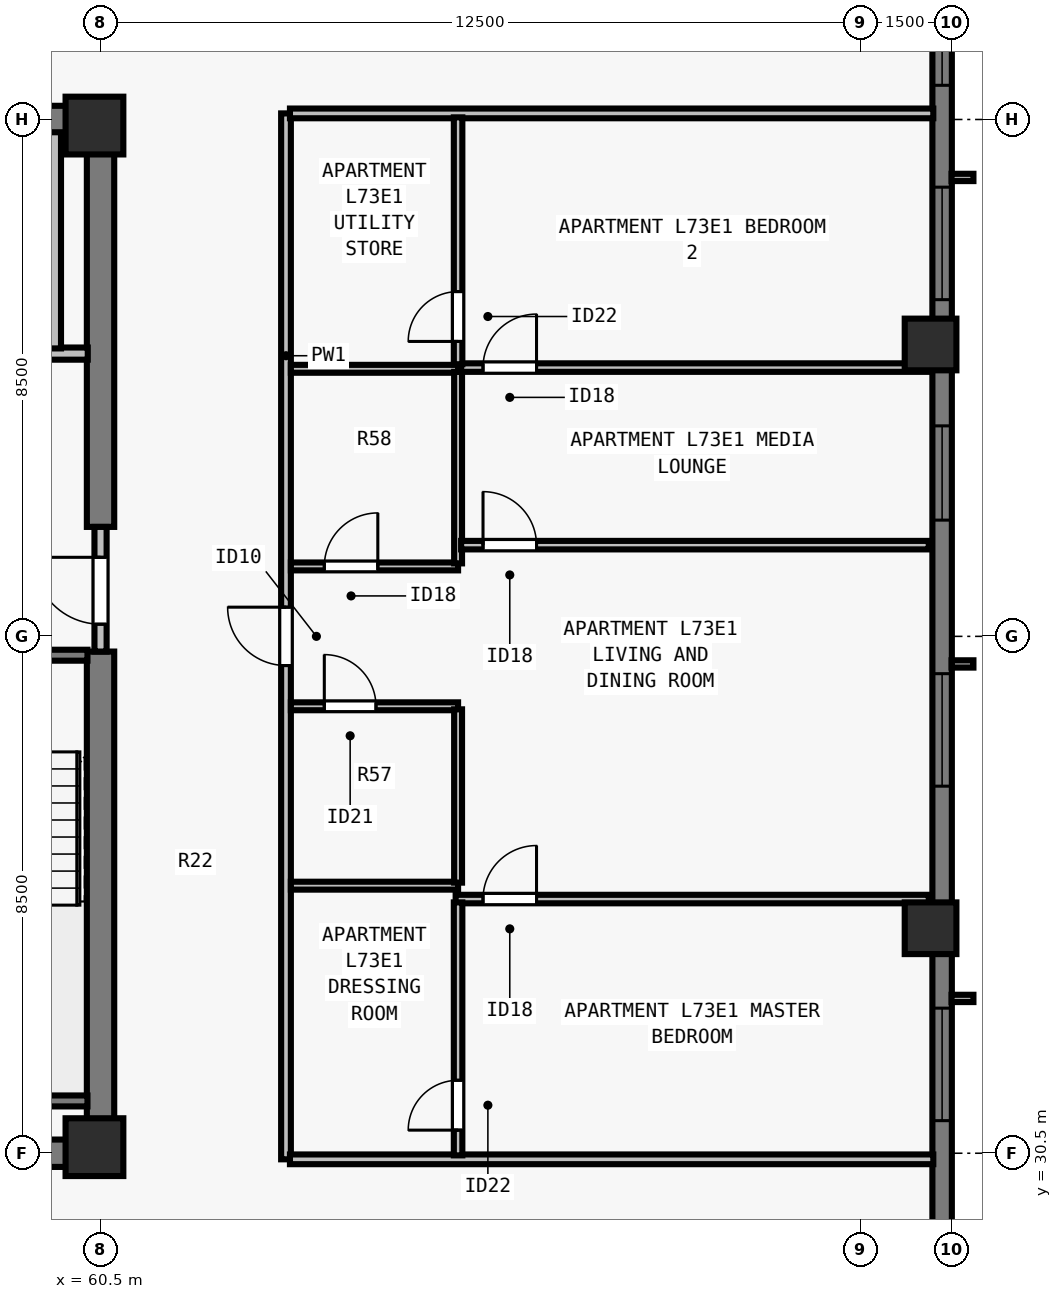
"""IFC4 building model, lengths in metres.
Left out: names, types, materials, properties, quantities, classifications, styles, units other than length and angle.
Written with IfcOpenShell. Run it as: python <this file> out.ifc"""

import sys

from ifc_helpers import new_model, si_unit, direction, frame, frame_2d, origin, origin_2d, place, context, subcontext, project, spatial, rectangle, extrude, element, fill, save


model = new_model("IFC4")
c1 = context("Model", 3, precision=1e-05, world=origin(), true_north=direction((0.0, 1.0)))
c2 = subcontext(c1, "Body", "Model", "MODEL_VIEW")
j1 = project(units=[si_unit("LENGTHUNIT", "METRE"), si_unit("PLANEANGLEUNIT", "RADIAN")], contexts=[c1])
p1 = place(None, origin())
s1 = spatial("IfcSite", under=j1, at=p1, CompositionType="ELEMENT")
p2 = place(p1, origin())
s2 = spatial("IfcBuilding", under=s1, at=p2, CompositionType="ELEMENT")
p3 = place(p2, frame((0.0, 0.0, 265.5)))
s3 = spatial("IfcBuildingStorey", under=s2, at=p3, CompositionType="ELEMENT", Elevation=265.5)
for number, where, z_axis, x_axis in (
    (1, (60.4, 30.6, 0.0), (0.0, 0.0, 1.0), (1.0, 0.0, 0.0)),
    (2, (60.4, 47.4, 0.0), (0.0, 0.0, 1.0), (1.0, 0.0, 0.0)),
):
    element("IfcColumn", number, at=place(p3, frame(where, z_axis=z_axis, x_axis=x_axis)), inside=s3, PredefinedType="COLUMN", context=c2, shape_type="SweptSolid", body=[
        extrude(rectangle(XDim=0.95, YDim=0.95, at=origin_2d()), origin(), (0.0, 0.0, 1.0), 3.5),
    ])
for number, where, z_axis, x_axis in (
    (3, (74.15, 34.2, 0.0), (0.0, 0.0, 1.0), (0.0, 1.0, 0.0)),
    (4, (74.15, 43.8, 0.0), (0.0, 0.0, 1.0), (0.0, 1.0, 0.0)),
):
    element("IfcColumn", number, at=place(p3, frame(where, z_axis=z_axis, x_axis=x_axis)), inside=s3, PredefinedType="COLUMN", context=c2, shape_type="SweptSolid", body=[
        extrude(rectangle(XDim=0.85, YDim=0.85, at=origin_2d()), origin(), (0.0, 0.0, 1.0), 3.5),
    ])
p4 = place(p3, frame((74.34, 56.5, 0.0), z_axis=(0.0, 0.0, 1.0), x_axis=(0.0, -1.0, 0.0)))
e5 = element("IfcWall", 5, at=p4, inside=s3, PredefinedType="SOLIDWALL", context=c2, shape_type="SweptSolid", body=[
    extrude(rectangle(XDim=34.702, YDim=0.32, at=frame_2d((17.351, 0.0))), origin(), (0.0, 0.0, 1.0), 3.29),
])
p5 = place(p4, frame((6.888, 0.0, 0.8)))
e6 = element("IfcOpeningElement", 6, at=p5, cuts=e5, PredefinedType="OPENING", context=c2, shape_type="SweptSolid", body=[
    extrude(rectangle(XDim=1.55, YDim=1.678, at=frame_2d((0.775, 0.839))), frame((0.0, 0.17, 0.0), z_axis=(0.0, -1.0, 0.0), x_axis=(1.0, 0.0, 0.0)), (0.0, 0.0, 1.0), 0.34),
])
p6 = place(p4, frame((10.113, 0.0, 0.8)))
e7 = element("IfcOpeningElement", 7, at=p6, cuts=e5, PredefinedType="OPENING", context=c2, shape_type="SweptSolid", body=[
    extrude(rectangle(XDim=1.85, YDim=1.678, at=frame_2d((0.925, 0.839))), frame((0.0, 0.17, 0.0), z_axis=(0.0, -1.0, 0.0), x_axis=(1.0, 0.0, 0.0)), (0.0, 0.0, 1.0), 0.34),
])
p7 = place(p4, frame((14.038, 0.0, 0.8)))
e8 = element("IfcOpeningElement", 8, at=p7, cuts=e5, PredefinedType="OPENING", context=c2, shape_type="SweptSolid", body=[
    extrude(rectangle(XDim=1.55, YDim=1.678, at=frame_2d((0.775, 0.839))), frame((0.0, 0.17, 0.0), z_axis=(0.0, -1.0, 0.0), x_axis=(1.0, 0.0, 0.0)), (0.0, 0.0, 1.0), 0.34),
])
p8 = place(p4, frame((18.114, 0.0, 0.8)))
e9 = element("IfcOpeningElement", 9, at=p8, cuts=e5, PredefinedType="OPENING", context=c2, shape_type="SweptSolid", body=[
    extrude(rectangle(XDim=1.85, YDim=1.678, at=frame_2d((0.925, 0.839))), frame((0.0, 0.17, 0.0), z_axis=(0.0, -1.0, 0.0), x_axis=(1.0, 0.0, 0.0)), (0.0, 0.0, 1.0), 0.34),
])
p9 = place(p4, frame((23.614, 0.0, 0.8)))
e10 = element("IfcOpeningElement", 10, at=p9, cuts=e5, PredefinedType="OPENING", context=c2, shape_type="SweptSolid", body=[
    extrude(rectangle(XDim=1.85, YDim=1.678, at=frame_2d((0.925, 0.839))), frame((0.0, 0.17, 0.0), z_axis=(0.0, -1.0, 0.0), x_axis=(1.0, 0.0, 0.0)), (0.0, 0.0, 1.0), 0.34),
])
p10 = place(p4, frame((29.24, 0.0, 0.8)))
e11 = element("IfcOpeningElement", 11, at=p10, cuts=e5, PredefinedType="OPENING", context=c2, shape_type="SweptSolid", body=[
    extrude(rectangle(XDim=1.55, YDim=1.678, at=frame_2d((0.775, 0.839))), frame((0.0, 0.17, 0.0), z_axis=(0.0, -1.0, 0.0), x_axis=(1.0, 0.0, 0.0)), (0.0, 0.0, 1.0), 0.34),
])
for number, where, z_axis, x_axis in (
    (12, (43.275, 30.5, 0.0), (0.0, 0.0, 1.0), (1.0, 0.0, 0.0)),
    (13, (43.275, 47.5, 0.0), (0.0, 0.0, 1.0), (1.0, 0.0, 0.0)),
):
    element("IfcWall", number, at=place(p3, frame(where, z_axis=z_axis, x_axis=x_axis)), inside=s3, PredefinedType="SHEAR", context=c2, shape_type="SweptSolid", body=[
        extrude(rectangle(XDim=17.45, YDim=0.45, at=frame_2d((8.725, 0.0))), origin(), (0.0, 0.0, 1.0), 3.29),
    ])
p11 = place(p3, frame((60.5, 30.715, 0.0), z_axis=(0.0, 0.0, 1.0), x_axis=(0.0, 1.0, 0.0)))
e14 = element("IfcWall", 14, at=p11, inside=s3, PredefinedType="SHEAR", context=c2, shape_type="SweptSolid", body=[
    extrude(rectangle(XDim=8.035, YDim=0.45, at=frame_2d((4.018, 0.0))), origin(), (0.0, 0.0, 1.0), 3.29),
])
p12 = place(p3, frame((60.5, 40.8, 0.0), z_axis=(0.0, 0.0, 1.0), x_axis=(0.0, 1.0, 0.0)))
e15 = element("IfcWall", 15, at=p12, inside=s3, PredefinedType="SHEAR", context=c2, shape_type="SweptSolid", body=[
    extrude(rectangle(XDim=6.485, YDim=0.45, at=frame_2d((3.242, 0.0))), origin(), (0.0, 0.0, 1.0), 3.29),
])
p13 = place(p3, frame((60.5, 38.75, 0.0), z_axis=(0.0, 0.0, 1.0), x_axis=(0.0, 1.0, 0.0)))
e16 = element("IfcWall", 16, at=p13, inside=s3, PredefinedType="SOLIDWALL", context=c2, shape_type="SweptSolid", body=[
    extrude(rectangle(XDim=2.05, YDim=0.2, at=frame_2d((1.025, 0.0))), origin(), (0.0, 0.0, 1.0), 3.29),
])
p14 = place(p13, frame((0.45, 0.0, 0.0)))
e17 = element("IfcOpeningElement", 17, at=p14, cuts=e16, PredefinedType="OPENING", context=c2, shape_type="SweptSolid", body=[
    extrude(rectangle(XDim=1.1, YDim=2.15, at=frame_2d((0.55, 1.075))), frame((0.0, 0.11, 0.0), z_axis=(0.0, -1.0, 0.0), x_axis=(1.0, 0.0, 0.0)), (0.0, 0.0, 1.0), 0.22),
])
p15 = place(p3, frame((56.735, 43.65, 0.0), z_axis=(0.0, 0.0, 1.0), x_axis=(1.0, 0.0, 0.0)))
e18 = element("IfcWall", 18, at=p15, inside=s3, PredefinedType="SOLIDWALL", context=c2, shape_type="SweptSolid", body=[
    extrude(rectangle(XDim=3.555, YDim=0.2, at=frame_2d((1.777, 0.0))), origin(), (0.0, 0.0, 1.0), 3.29),
])
p16 = place(p15, frame((1.295, 0.0, 0.0)))
e19 = element("IfcOpeningElement", 19, at=p16, cuts=e18, PredefinedType="OPENING", context=c2, shape_type="SweptSolid", body=[
    extrude(rectangle(XDim=1.1, YDim=2.2, at=frame_2d((0.55, 1.1))), frame((0.0, 0.11, 0.0), z_axis=(0.0, -1.0, 0.0), x_axis=(1.0, 0.0, 0.0)), (0.0, 0.0, 1.0), 0.22),
])
p17 = place(p3, frame((59.75, 43.735, 0.0), z_axis=(0.0, 0.0, 1.0), x_axis=(0.0, 1.0, 0.0)))
e20 = element("IfcWall", 20, at=p17, inside=s3, PredefinedType="SOLIDWALL", context=c2, shape_type="SweptSolid", body=[
    extrude(rectangle(XDim=3.555, YDim=0.2, at=frame_2d((1.777, 0.0))), origin(), (0.0, 0.0, 1.0), 3.29),
])
p18 = place(p3, frame((63.55, 30.4, 0.0), z_axis=(0.0, 0.0, 1.0), x_axis=(0.0, 1.0, 0.0)))
e21 = element("IfcWall", 21, at=p18, inside=s3, PredefinedType="PARTITIONING", context=c2, shape_type="SweptSolid", body=[
    extrude(rectangle(XDim=17.2, YDim=0.16, at=frame_2d((8.6, 0.0))), origin(), (0.0, 0.0, 1.0), 3.29),
])
p19 = place(p18, frame((8.12, 0.0, 0.0)))
e22 = element("IfcOpeningElement", 22, at=p19, cuts=e21, PredefinedType="OPENING", context=c2, shape_type="SweptSolid", body=[
    extrude(rectangle(XDim=0.96, YDim=2.18, at=frame_2d((0.48, 1.09))), frame((0.0, 0.09, 0.0), z_axis=(0.0, -1.0, 0.0), x_axis=(1.0, 0.0, 0.0)), (0.0, 0.0, 1.0), 0.18),
])
for number, where, z_axis, x_axis in (
    (23, (63.615, 30.4, 0.0), (0.0, 0.0, 1.0), (1.0, 0.0, 0.0)),
    (24, (63.615, 47.6, 0.0), (0.0, 0.0, 1.0), (1.0, 0.0, 0.0)),
):
    element("IfcWall", number, at=place(p3, frame(where, z_axis=z_axis, x_axis=x_axis)), inside=s3, PredefinedType="PARTITIONING", context=c2, shape_type="SweptSolid", body=[
        extrude(rectangle(XDim=10.58, YDim=0.16, at=frame_2d((5.29, 0.0))), origin(), (0.0, 0.0, 1.0), 3.29),
    ])
p20 = place(p3, frame((63.63, 34.9, 0.0), z_axis=(0.0, 0.0, 1.0), x_axis=(1.0, 0.0, 0.0)))
e25 = element("IfcWall", 25, at=p20, inside=s3, PredefinedType="PLUMBINGWALL", context=c2, shape_type="SweptSolid", body=[
    extrude(rectangle(XDim=2.75, YDim=0.13, at=frame_2d((1.375, 0.0))), origin(), (0.0, 0.0, 1.0), 3.29),
])
p21 = place(p3, frame((63.63, 37.85, 0.0), z_axis=(0.0, 0.0, 1.0), x_axis=(1.0, 0.0, 0.0)))
e26 = element("IfcWall", 26, at=p21, inside=s3, PredefinedType="PLUMBINGWALL", context=c2, shape_type="SweptSolid", body=[
    extrude(rectangle(XDim=2.75, YDim=0.13, at=frame_2d((1.375, 0.0))), origin(), (0.0, 0.0, 1.0), 3.29),
])
p22 = place(p21, frame((0.55, 0.0, 0.0)))
e27 = element("IfcOpeningElement", 27, at=p22, cuts=e26, PredefinedType="OPENING", context=c2, shape_type="SweptSolid", body=[
    extrude(rectangle(XDim=0.85, YDim=2.08, at=frame_2d((0.425, 1.04))), frame((0.0, 0.075, 0.0), z_axis=(0.0, -1.0, 0.0), x_axis=(1.0, 0.0, 0.0)), (0.0, 0.0, 1.0), 0.15),
])
p23 = place(p3, frame((66.38, 34.95, 0.0), z_axis=(0.0, 0.0, 1.0), x_axis=(0.0, 1.0, 0.0)))
e28 = element("IfcWall", 28, at=p23, inside=s3, PredefinedType="PLUMBINGWALL", context=c2, shape_type="SweptSolid", body=[
    extrude(rectangle(XDim=2.85, YDim=0.13, at=frame_2d((1.425, 0.0))), origin(), (0.0, 0.0, 1.0), 3.29),
])
p24 = place(p3, frame((63.63, 43.4, 0.0), z_axis=(0.0, 0.0, 1.0), x_axis=(1.0, 0.0, 0.0)))
e29 = element("IfcWall", 29, at=p24, inside=s3, PredefinedType="PLUMBINGWALL", context=c2, shape_type="SweptSolid", body=[
    extrude(rectangle(XDim=2.75, YDim=0.13, at=frame_2d((1.375, 0.0))), origin(), (0.0, 0.0, 1.0), 3.29),
])
p25 = place(p3, frame((63.63, 40.15, 0.0), z_axis=(0.0, 0.0, 1.0), x_axis=(1.0, 0.0, 0.0)))
e30 = element("IfcWall", 30, at=p25, inside=s3, PredefinedType="PLUMBINGWALL", context=c2, shape_type="SweptSolid", body=[
    extrude(rectangle(XDim=2.75, YDim=0.13, at=frame_2d((1.375, 0.0))), origin(), (0.0, 0.0, 1.0), 3.29),
])
p26 = place(p25, frame((0.55, 0.0, 0.0)))
e31 = element("IfcOpeningElement", 31, at=p26, cuts=e30, PredefinedType="OPENING", context=c2, shape_type="SweptSolid", body=[
    extrude(rectangle(XDim=0.88, YDim=2.1, at=frame_2d((0.44, 1.05))), frame((0.0, 0.075, 0.0), z_axis=(0.0, -1.0, 0.0), x_axis=(1.0, 0.0, 0.0)), (0.0, 0.0, 1.0), 0.15),
])
p27 = place(p3, frame((66.38, 40.2, 0.0), z_axis=(0.0, 0.0, 1.0), x_axis=(0.0, 1.0, 0.0)))
e32 = element("IfcWall", 32, at=p27, inside=s3, PredefinedType="PLUMBINGWALL", context=c2, shape_type="SweptSolid", body=[
    extrude(rectangle(XDim=3.15, YDim=0.13, at=frame_2d((1.575, 0.0))), origin(), (0.0, 0.0, 1.0), 3.29),
])
p28 = place(p3, frame((66.34, 34.68, 0.0), z_axis=(0.0, 0.0, 1.0), x_axis=(1.0, 0.0, 0.0)))
e33 = element("IfcWall", 33, at=p28, inside=s3, PredefinedType="PARTITIONING", context=c2, shape_type="SweptSolid", body=[
    extrude(rectangle(XDim=7.78, YDim=0.14, at=frame_2d((3.89, 0.0))), origin(), (0.0, 0.0, 1.0), 3.29),
])
p29 = place(p28, frame((0.45, 0.0, 0.0)))
e34 = element("IfcOpeningElement", 34, at=p29, cuts=e33, PredefinedType="OPENING", context=c2, shape_type="SweptSolid", body=[
    extrude(rectangle(XDim=0.88, YDim=2.1, at=frame_2d((0.44, 1.05))), frame((0.0, 0.08, 0.0), z_axis=(0.0, -1.0, 0.0), x_axis=(1.0, 0.0, 0.0)), (0.0, 0.0, 1.0), 0.16),
])
p30 = place(p3, frame((66.38, 30.465, 0.0), z_axis=(0.0, 0.0, 1.0), x_axis=(0.0, 1.0, 0.0)))
e35 = element("IfcWall", 35, at=p30, inside=s3, PredefinedType="PARTITIONING", context=c2, shape_type="SweptSolid", body=[
    extrude(rectangle(XDim=4.16, YDim=0.14, at=frame_2d((2.08, 0.0))), origin(), (0.0, 0.0, 1.0), 3.29),
])
p31 = place(p30, frame((0.415, 0.0, 0.0)))
e36 = element("IfcOpeningElement", 36, at=p31, cuts=e35, PredefinedType="OPENING", context=c2, shape_type="SweptSolid", body=[
    extrude(rectangle(XDim=0.82, YDim=2.1, at=frame_2d((0.41, 1.05))), frame((0.0, 0.08, 0.0), z_axis=(0.0, -1.0, 0.0), x_axis=(1.0, 0.0, 0.0)), (0.0, 0.0, 1.0), 0.16),
])
p32 = place(p3, frame((66.43, 43.42, 0.0), z_axis=(0.0, 0.0, 1.0), x_axis=(1.0, 0.0, 0.0)))
e37 = element("IfcWall", 37, at=p32, inside=s3, PredefinedType="PARTITIONING", context=c2, shape_type="SweptSolid", body=[
    extrude(rectangle(XDim=7.69, YDim=0.14, at=frame_2d((3.845, 0.0))), origin(), (0.0, 0.0, 1.0), 3.29),
])
p33 = place(p32, frame((0.36, 0.0, 0.0)))
e38 = element("IfcOpeningElement", 38, at=p33, cuts=e37, PredefinedType="OPENING", context=c2, shape_type="SweptSolid", body=[
    extrude(rectangle(XDim=0.88, YDim=2.1, at=frame_2d((0.44, 1.05))), frame((0.0, 0.08, 0.0), z_axis=(0.0, -1.0, 0.0), x_axis=(1.0, 0.0, 0.0)), (0.0, 0.0, 1.0), 0.16),
])
p34 = place(p3, frame((66.38, 43.475, 0.0), z_axis=(0.0, 0.0, 1.0), x_axis=(0.0, 1.0, 0.0)))
e39 = element("IfcWall", 39, at=p34, inside=s3, PredefinedType="PARTITIONING", context=c2, shape_type="SweptSolid", body=[
    extrude(rectangle(XDim=4.06, YDim=0.14, at=frame_2d((2.03, 0.0))), origin(), (0.0, 0.0, 1.0), 3.29),
])
p35 = place(p34, frame((0.375, 0.0, 0.0)))
e40 = element("IfcOpeningElement", 40, at=p35, cuts=e39, PredefinedType="OPENING", context=c2, shape_type="SweptSolid", body=[
    extrude(rectangle(XDim=0.82, YDim=2.1, at=frame_2d((0.41, 1.05))), frame((0.0, 0.08, 0.0), z_axis=(0.0, -1.0, 0.0), x_axis=(1.0, 0.0, 0.0)), (0.0, 0.0, 1.0), 0.16),
])
p36 = place(p3, frame((66.43, 40.5, 0.0), z_axis=(0.0, 0.0, 1.0), x_axis=(1.0, 0.0, 0.0)))
e41 = element("IfcWall", 41, at=p36, inside=s3, PredefinedType="PARTITIONING", context=c2, shape_type="SweptSolid", body=[
    extrude(rectangle(XDim=7.69, YDim=0.14, at=frame_2d((3.845, 0.0))), origin(), (0.0, 0.0, 1.0), 3.29),
])
p37 = place(p36, frame((0.36, 0.0, 0.0)))
e42 = element("IfcOpeningElement", 42, at=p37, cuts=e41, PredefinedType="OPENING", context=c2, shape_type="SweptSolid", body=[
    extrude(rectangle(XDim=0.88, YDim=2.1, at=frame_2d((0.44, 1.05))), frame((0.0, 0.08, 0.0), z_axis=(0.0, -1.0, 0.0), x_axis=(1.0, 0.0, 0.0)), (0.0, 0.0, 1.0), 0.16),
])
p38 = place(p3, frame((57.005, 38.69, 0.0), z_axis=(0.0, 0.0, 1.0), x_axis=(1.0, 0.0, 0.0)))
e43 = element("IfcWall", 43, at=p38, inside=s3, PredefinedType="SOLIDWALL", context=c2, shape_type="SweptSolid", body=[
    extrude(rectangle(XDim=3.28, YDim=0.18, at=frame_2d((1.64, 0.0))), origin(), (0.0, 0.0, 1.0), 3.29),
])
p39 = place(p38, frame((1.165, 0.0, 0.0)))
e44 = element("IfcOpeningElement", 44, at=p39, cuts=e43, PredefinedType="OPENING", context=c2, shape_type="SweptSolid", body=[
    extrude(rectangle(XDim=0.95, YDim=2.15, at=frame_2d((0.475, 1.075))), frame((0.0, 0.1, 0.0), z_axis=(0.0, -1.0, 0.0), x_axis=(1.0, 0.0, 0.0)), (0.0, 0.0, 1.0), 0.2),
])
p40 = place(p3, frame((57.005, 31.36, 0.0), z_axis=(0.0, 0.0, 1.0), x_axis=(1.0, 0.0, 0.0)))
e45 = element("IfcWall", 45, at=p40, inside=s3, PredefinedType="SOLIDWALL", context=c2, shape_type="SweptSolid", body=[
    extrude(rectangle(XDim=3.28, YDim=0.18, at=frame_2d((1.64, 0.0))), origin(), (0.0, 0.0, 1.0), 3.29),
])
p41 = place(p5, origin())
e46 = element("IfcWindow", 46, at=p41, inside=s3, PartitioningType="SINGLE_PANEL", PredefinedType="WINDOW", context=c2, shape_type="SweptSolid", body=[
    extrude(rectangle(XDim=1.55, YDim=1.678, at=frame_2d((0.775, 0.839))), frame((0.0, -0.05, 0.0), z_axis=(0.0, -1.0, 0.0), x_axis=(1.0, 0.0, 0.0)), (0.0, 0.0, 1.0), 0.06),
])
fill(e6, e46)
p42 = place(p6, origin())
e47 = element("IfcWindow", 47, at=p42, inside=s3, PartitioningType="SINGLE_PANEL", PredefinedType="WINDOW", context=c2, shape_type="SweptSolid", body=[
    extrude(rectangle(XDim=1.85, YDim=1.678, at=frame_2d((0.925, 0.839))), frame((0.0, -0.05, 0.0), z_axis=(0.0, -1.0, 0.0), x_axis=(1.0, 0.0, 0.0)), (0.0, 0.0, 1.0), 0.06),
])
fill(e7, e47)
p43 = place(p7, origin())
e48 = element("IfcWindow", 48, at=p43, inside=s3, PartitioningType="SINGLE_PANEL", PredefinedType="WINDOW", context=c2, shape_type="SweptSolid", body=[
    extrude(rectangle(XDim=1.55, YDim=1.678, at=frame_2d((0.775, 0.839))), frame((0.0, -0.05, 0.0), z_axis=(0.0, -1.0, 0.0), x_axis=(1.0, 0.0, 0.0)), (0.0, 0.0, 1.0), 0.06),
])
fill(e8, e48)
p44 = place(p8, origin())
e49 = element("IfcWindow", 49, at=p44, inside=s3, PartitioningType="SINGLE_PANEL", PredefinedType="WINDOW", context=c2, shape_type="SweptSolid", body=[
    extrude(rectangle(XDim=1.85, YDim=1.678, at=frame_2d((0.925, 0.839))), frame((0.0, -0.05, 0.0), z_axis=(0.0, -1.0, 0.0), x_axis=(1.0, 0.0, 0.0)), (0.0, 0.0, 1.0), 0.06),
])
fill(e9, e49)
p45 = place(p9, origin())
e50 = element("IfcWindow", 50, at=p45, inside=s3, PartitioningType="SINGLE_PANEL", PredefinedType="WINDOW", context=c2, shape_type="SweptSolid", body=[
    extrude(rectangle(XDim=1.85, YDim=1.678, at=frame_2d((0.925, 0.839))), frame((0.0, -0.05, 0.0), z_axis=(0.0, -1.0, 0.0), x_axis=(1.0, 0.0, 0.0)), (0.0, 0.0, 1.0), 0.06),
])
fill(e10, e50)
p46 = place(p14, origin())
e51 = element("IfcDoor", 51, at=p46, inside=s3, OperationType="SINGLE_SWING_RIGHT", PredefinedType="DOOR", context=c2, shape_type="SweptSolid", body=[
    extrude(rectangle(XDim=1.1, YDim=2.15, at=frame_2d((0.55, 1.075))), frame((0.0, 0.025, 0.0), z_axis=(0.0, -1.0, 0.0), x_axis=(1.0, 0.0, 0.0)), (0.0, 0.0, 1.0), 0.05),
])
fill(e17, e51)
p47 = place(p22, origin())
e52 = element("IfcDoor", 52, at=p47, inside=s3, OperationType="SINGLE_SWING_LEFT", PredefinedType="DOOR", context=c2, shape_type="SweptSolid", body=[
    extrude(rectangle(XDim=0.85, YDim=2.08, at=frame_2d((0.425, 1.04))), frame((0.0, 0.025, 0.0), z_axis=(0.0, -1.0, 0.0), x_axis=(1.0, 0.0, 0.0)), (0.0, 0.0, 1.0), 0.05),
])
fill(e27, e52)
p48 = place(p26, origin())
e53 = element("IfcDoor", 53, at=p48, inside=s3, OperationType="SINGLE_SWING_RIGHT", PredefinedType="DOOR", context=c2, shape_type="SweptSolid", body=[
    extrude(rectangle(XDim=0.88, YDim=2.1, at=frame_2d((0.44, 1.05))), frame((0.0, 0.025, 0.0), z_axis=(0.0, -1.0, 0.0), x_axis=(1.0, 0.0, 0.0)), (0.0, 0.0, 1.0), 0.05),
])
fill(e31, e53)
p49 = place(p31, origin())
e54 = element("IfcDoor", 54, at=p49, inside=s3, OperationType="SINGLE_SWING_LEFT", PredefinedType="DOOR", context=c2, shape_type="SweptSolid", body=[
    extrude(rectangle(XDim=0.82, YDim=2.1, at=frame_2d((0.41, 1.05))), frame((0.0, 0.025, 0.0), z_axis=(0.0, -1.0, 0.0), x_axis=(1.0, 0.0, 0.0)), (0.0, 0.0, 1.0), 0.05),
])
fill(e36, e54)
p50 = place(p29, origin())
e55 = element("IfcDoor", 55, at=p50, inside=s3, OperationType="SINGLE_SWING_RIGHT", PredefinedType="DOOR", context=c2, shape_type="SweptSolid", body=[
    extrude(rectangle(XDim=0.88, YDim=2.1, at=frame_2d((0.44, 1.05))), frame((0.0, 0.025, 0.0), z_axis=(0.0, -1.0, 0.0), x_axis=(1.0, 0.0, 0.0)), (0.0, 0.0, 1.0), 0.05),
])
fill(e34, e55)
p51 = place(p35, origin())
e56 = element("IfcDoor", 56, at=p51, inside=s3, OperationType="SINGLE_SWING_LEFT", PredefinedType="DOOR", context=c2, shape_type="SweptSolid", body=[
    extrude(rectangle(XDim=0.82, YDim=2.1, at=frame_2d((0.41, 1.05))), frame((0.0, 0.025, 0.0), z_axis=(0.0, -1.0, 0.0), x_axis=(1.0, 0.0, 0.0)), (0.0, 0.0, 1.0), 0.05),
])
fill(e40, e56)
p52 = place(p33, origin())
e57 = element("IfcDoor", 57, at=p52, inside=s3, OperationType="SINGLE_SWING_RIGHT", PredefinedType="DOOR", context=c2, shape_type="SweptSolid", body=[
    extrude(rectangle(XDim=0.88, YDim=2.1, at=frame_2d((0.44, 1.05))), frame((0.0, 0.025, 0.0), z_axis=(0.0, -1.0, 0.0), x_axis=(1.0, 0.0, 0.0)), (0.0, 0.0, 1.0), 0.05),
])
fill(e38, e57)
p53 = place(p37, origin())
e58 = element("IfcDoor", 58, at=p53, inside=s3, OperationType="SINGLE_SWING_LEFT", PredefinedType="DOOR", context=c2, shape_type="SweptSolid", body=[
    extrude(rectangle(XDim=0.88, YDim=2.1, at=frame_2d((0.44, 1.05))), frame((0.0, 0.025, 0.0), z_axis=(0.0, -1.0, 0.0), x_axis=(1.0, 0.0, 0.0)), (0.0, 0.0, 1.0), 0.05),
])
fill(e42, e58)
p54 = place(p19, origin())
e59 = element("IfcDoor", 59, at=p54, inside=s3, OperationType="SINGLE_SWING_RIGHT", PredefinedType="DOOR", context=c2, shape_type="SweptSolid", body=[
    extrude(rectangle(XDim=0.96, YDim=2.18, at=frame_2d((0.48, 1.09))), frame((0.0, 0.025, 0.0), z_axis=(0.0, -1.0, 0.0), x_axis=(1.0, 0.0, 0.0)), (0.0, 0.0, 1.0), 0.05),
])
fill(e22, e59)
save(model, sys.argv[1])
